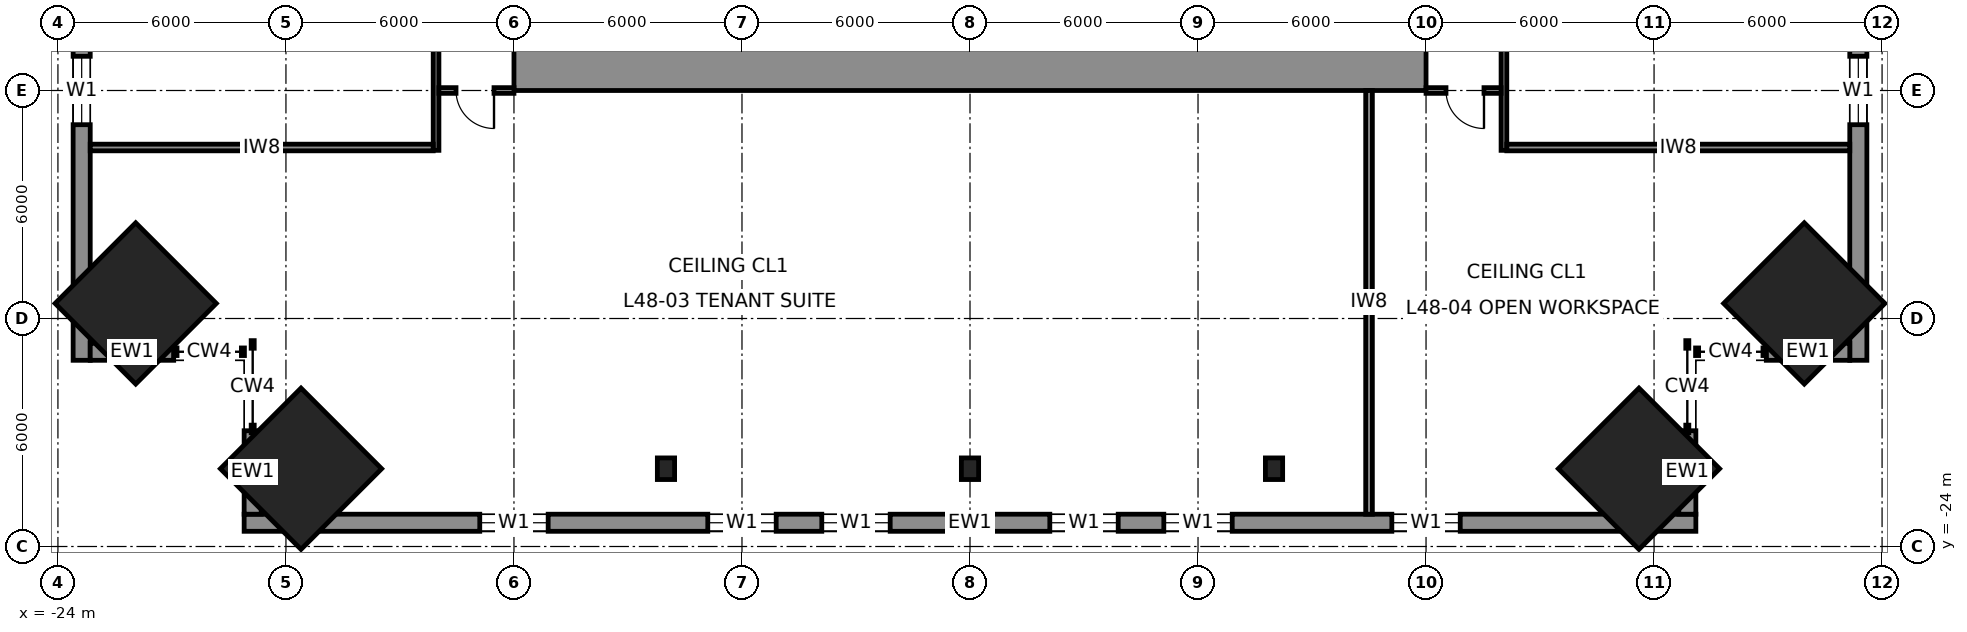
"""IFC4 building model, lengths in metres.
Left out: names, types, materials, properties, quantities, classifications, styles, units other than length and angle.
Written with IfcOpenShell. Run it as: python <this file> out.ifc"""

import sys

from ifc_helpers import new_model, si_unit, direction, frame, frame_2d, origin, origin_2d, place, context, subcontext, project, spatial, rectangle, i_section, extrude, element, fill, save


model = new_model("IFC4")
c1 = context("Model", 3, precision=1e-05, world=origin(), true_north=direction((0.0, 1.0)))
c2 = subcontext(c1, "Body", "Model", "MODEL_VIEW")
j1 = project(units=[si_unit("LENGTHUNIT", "METRE"), si_unit("PLANEANGLEUNIT", "RADIAN")], contexts=[c1])
p1 = place(None, origin())
s1 = spatial("IfcSite", under=j1, at=p1, CompositionType="ELEMENT")
p2 = place(p1, origin())
s2 = spatial("IfcBuilding", under=s1, at=p2, CompositionType="ELEMENT")
p3 = place(p2, frame((0.0, 0.0, 221.8)))
s3 = spatial("IfcBuildingStorey", under=s2, at=p3, CompositionType="ELEMENT", Elevation=221.8)
for number, where, z_axis, x_axis in (
    (1, (21.953, -17.603, 0.0), (-0.04, 0.04, 0.998), (-0.708, -0.707, 0.0)),
    (2, (17.603, -21.953, 0.0), (-0.04, 0.04, 0.998), (-0.707, -0.708, 0.0)),
    (3, (-17.603, -21.953, 0.0), (0.04, 0.04, 0.998), (-0.707, 0.708, 0.0)),
    (4, (-21.953, -17.603, 0.0), (0.04, 0.04, 0.998), (-0.708, 0.707, 0.0)),
):
    element("IfcColumn", number, at=place(p3, frame(where, z_axis=z_axis, x_axis=x_axis)), inside=s3, PredefinedType="COLUMN", context=c2, shape_type="SweptSolid", body=[
        extrude(rectangle(XDim=3.0, YDim=3.0, at=origin_2d()), origin(), (0.0, 0.0, 1.0), 4.007),
    ])
for number, where, z_axis, x_axis in (
    (5, (0.0, -21.953, 0.0), (0.0, 0.04, 0.999), (-1.0, 0.0, 0.0)),
    (6, (-8.0, -21.953, 0.0), (0.0, 0.04, 0.999), (-1.0, 0.0, 0.0)),
    (7, (8.0, -21.953, 0.0), (0.0, 0.04, 0.999), (-1.0, 0.0, 0.0)),
):
    element("IfcColumn", number, at=place(p3, frame(where, z_axis=z_axis, x_axis=x_axis)), inside=s3, PredefinedType="COLUMN", context=c2, shape_type="SweptSolid", body=[
        extrude(i_section(OverallWidth=0.454, OverallDepth=0.569, WebThickness=0.078, FlangeThickness=0.125, at=origin_2d()), origin(), (0.0, 0.0, 1.0), 4.003),
    ])
p4 = place(p3, frame((12.0, -11.25, 0.0), z_axis=(0.0, 0.0, 1.0), x_axis=(-1.0, 0.0, 0.0)))
e8 = element("IfcWall", 8, at=p4, inside=s3, PredefinedType="SHEAR", context=c2, shape_type="SweptSolid", body=[
    extrude(rectangle(XDim=24.0, YDim=1.5, at=frame_2d((12.0, 0.0))), origin(), (0.0, 0.0, 1.0), 4.0),
])
p5 = place(p3, frame((23.375, -19.1, 0.0), z_axis=(0.0, 0.0, 1.0), x_axis=(0.0, 1.0, 0.0)))
e9 = element("IfcWall", 9, at=p5, inside=s3, PredefinedType="SOLIDWALL", context=c2, shape_type="SweptSolid", body=[
    extrude(rectangle(XDim=38.2, YDim=0.45, at=frame_2d((19.1, 0.0))), origin(), (0.0, 0.0, 1.0), 3.83),
])
p6 = place(p5, frame((6.2, 0.0, 0.7)))
e10 = element("IfcOpeningElement", 10, at=p6, cuts=e9, PredefinedType="OPENING", context=c2, shape_type="SweptSolid", body=[
    extrude(rectangle(XDim=1.8, YDim=2.6, at=frame_2d((0.9, 1.3))), frame((0.0, 0.235, 0.0), z_axis=(0.0, -1.0, 0.0), x_axis=(1.0, 0.0, 0.0)), (0.0, 0.0, 1.0), 0.47),
])
p7 = place(p5, frame((12.2, 0.0, 0.7)))
e11 = element("IfcOpeningElement", 11, at=p7, cuts=e9, PredefinedType="OPENING", context=c2, shape_type="SweptSolid", body=[
    extrude(rectangle(XDim=1.8, YDim=2.6, at=frame_2d((0.9, 1.3))), frame((0.0, 0.235, 0.0), z_axis=(0.0, -1.0, 0.0), x_axis=(1.0, 0.0, 0.0)), (0.0, 0.0, 1.0), 0.47),
])
p8 = place(p5, frame((15.2, 0.0, 0.7)))
e12 = element("IfcOpeningElement", 12, at=p8, cuts=e9, PredefinedType="OPENING", context=c2, shape_type="SweptSolid", body=[
    extrude(rectangle(XDim=1.8, YDim=2.6, at=frame_2d((0.9, 1.3))), frame((0.0, 0.235, 0.0), z_axis=(0.0, -1.0, 0.0), x_axis=(1.0, 0.0, 0.0)), (0.0, 0.0, 1.0), 0.47),
])
p9 = place(p5, frame((21.2, 0.0, 0.7)))
e13 = element("IfcOpeningElement", 13, at=p9, cuts=e9, PredefinedType="OPENING", context=c2, shape_type="SweptSolid", body=[
    extrude(rectangle(XDim=1.8, YDim=2.6, at=frame_2d((0.9, 1.3))), frame((0.0, 0.235, 0.0), z_axis=(0.0, -1.0, 0.0), x_axis=(1.0, 0.0, 0.0)), (0.0, 0.0, 1.0), 0.47),
])
p10 = place(p5, frame((24.2, 0.0, 0.7)))
e14 = element("IfcOpeningElement", 14, at=p10, cuts=e9, PredefinedType="OPENING", context=c2, shape_type="SweptSolid", body=[
    extrude(rectangle(XDim=1.8, YDim=2.6, at=frame_2d((0.9, 1.3))), frame((0.0, 0.235, 0.0), z_axis=(0.0, -1.0, 0.0), x_axis=(1.0, 0.0, 0.0)), (0.0, 0.0, 1.0), 0.47),
])
p11 = place(p5, frame((30.2, 0.0, 0.7)))
e15 = element("IfcOpeningElement", 15, at=p11, cuts=e9, PredefinedType="OPENING", context=c2, shape_type="SweptSolid", body=[
    extrude(rectangle(XDim=1.8, YDim=2.6, at=frame_2d((0.9, 1.3))), frame((0.0, 0.235, 0.0), z_axis=(0.0, -1.0, 0.0), x_axis=(1.0, 0.0, 0.0)), (0.0, 0.0, 1.0), 0.47),
])
p12 = place(p3, frame((-19.1, -23.375, 0.0), z_axis=(0.0, 0.0, 1.0), x_axis=(1.0, 0.0, 0.0)))
e16 = element("IfcWall", 16, at=p12, inside=s3, PredefinedType="SOLIDWALL", context=c2, shape_type="SweptSolid", body=[
    extrude(rectangle(XDim=38.2, YDim=0.45, at=frame_2d((19.1, 0.0))), origin(), (0.0, 0.0, 1.0), 3.83),
])
p13 = place(p12, frame((6.2, 0.0, 0.7)))
e17 = element("IfcOpeningElement", 17, at=p13, cuts=e16, PredefinedType="OPENING", context=c2, shape_type="SweptSolid", body=[
    extrude(rectangle(XDim=1.8, YDim=2.6, at=frame_2d((0.9, 1.3))), frame((0.0, 0.235, 0.0), z_axis=(0.0, -1.0, 0.0), x_axis=(1.0, 0.0, 0.0)), (0.0, 0.0, 1.0), 0.47),
])
p14 = place(p12, frame((12.2, 0.0, 0.7)))
e18 = element("IfcOpeningElement", 18, at=p14, cuts=e16, PredefinedType="OPENING", context=c2, shape_type="SweptSolid", body=[
    extrude(rectangle(XDim=1.8, YDim=2.6, at=frame_2d((0.9, 1.3))), frame((0.0, 0.235, 0.0), z_axis=(0.0, -1.0, 0.0), x_axis=(1.0, 0.0, 0.0)), (0.0, 0.0, 1.0), 0.47),
])
p15 = place(p12, frame((15.2, 0.0, 0.7)))
e19 = element("IfcOpeningElement", 19, at=p15, cuts=e16, PredefinedType="OPENING", context=c2, shape_type="SweptSolid", body=[
    extrude(rectangle(XDim=1.8, YDim=2.6, at=frame_2d((0.9, 1.3))), frame((0.0, 0.235, 0.0), z_axis=(0.0, -1.0, 0.0), x_axis=(1.0, 0.0, 0.0)), (0.0, 0.0, 1.0), 0.47),
])
p16 = place(p12, frame((21.2, 0.0, 0.7)))
e20 = element("IfcOpeningElement", 20, at=p16, cuts=e16, PredefinedType="OPENING", context=c2, shape_type="SweptSolid", body=[
    extrude(rectangle(XDim=1.8, YDim=2.6, at=frame_2d((0.9, 1.3))), frame((0.0, 0.235, 0.0), z_axis=(0.0, -1.0, 0.0), x_axis=(1.0, 0.0, 0.0)), (0.0, 0.0, 1.0), 0.47),
])
p17 = place(p12, frame((24.2, 0.0, 0.7)))
e21 = element("IfcOpeningElement", 21, at=p17, cuts=e16, PredefinedType="OPENING", context=c2, shape_type="SweptSolid", body=[
    extrude(rectangle(XDim=1.8, YDim=2.6, at=frame_2d((0.9, 1.3))), frame((0.0, 0.235, 0.0), z_axis=(0.0, -1.0, 0.0), x_axis=(1.0, 0.0, 0.0)), (0.0, 0.0, 1.0), 0.47),
])
p18 = place(p12, frame((30.2, 0.0, 0.7)))
e22 = element("IfcOpeningElement", 22, at=p18, cuts=e16, PredefinedType="OPENING", context=c2, shape_type="SweptSolid", body=[
    extrude(rectangle(XDim=1.8, YDim=2.6, at=frame_2d((0.9, 1.3))), frame((0.0, 0.235, 0.0), z_axis=(0.0, -1.0, 0.0), x_axis=(1.0, 0.0, 0.0)), (0.0, 0.0, 1.0), 0.47),
])
p19 = place(p3, frame((-23.375, 19.1, 0.0), z_axis=(0.0, 0.0, 1.0), x_axis=(0.0, -1.0, 0.0)))
e23 = element("IfcWall", 23, at=p19, inside=s3, PredefinedType="SOLIDWALL", context=c2, shape_type="SweptSolid", body=[
    extrude(rectangle(XDim=38.2, YDim=0.45, at=frame_2d((19.1, 0.0))), origin(), (0.0, 0.0, 1.0), 3.83),
])
p20 = place(p19, frame((6.2, 0.0, 0.7)))
e24 = element("IfcOpeningElement", 24, at=p20, cuts=e23, PredefinedType="OPENING", context=c2, shape_type="SweptSolid", body=[
    extrude(rectangle(XDim=1.8, YDim=2.6, at=frame_2d((0.9, 1.3))), frame((0.0, 0.235, 0.0), z_axis=(0.0, -1.0, 0.0), x_axis=(1.0, 0.0, 0.0)), (0.0, 0.0, 1.0), 0.47),
])
p21 = place(p19, frame((12.2, 0.0, 0.7)))
e25 = element("IfcOpeningElement", 25, at=p21, cuts=e23, PredefinedType="OPENING", context=c2, shape_type="SweptSolid", body=[
    extrude(rectangle(XDim=1.8, YDim=2.6, at=frame_2d((0.9, 1.3))), frame((0.0, 0.235, 0.0), z_axis=(0.0, -1.0, 0.0), x_axis=(1.0, 0.0, 0.0)), (0.0, 0.0, 1.0), 0.47),
])
p22 = place(p19, frame((15.2, 0.0, 0.7)))
e26 = element("IfcOpeningElement", 26, at=p22, cuts=e23, PredefinedType="OPENING", context=c2, shape_type="SweptSolid", body=[
    extrude(rectangle(XDim=1.8, YDim=2.6, at=frame_2d((0.9, 1.3))), frame((0.0, 0.235, 0.0), z_axis=(0.0, -1.0, 0.0), x_axis=(1.0, 0.0, 0.0)), (0.0, 0.0, 1.0), 0.47),
])
p23 = place(p19, frame((21.2, 0.0, 0.7)))
e27 = element("IfcOpeningElement", 27, at=p23, cuts=e23, PredefinedType="OPENING", context=c2, shape_type="SweptSolid", body=[
    extrude(rectangle(XDim=1.8, YDim=2.6, at=frame_2d((0.9, 1.3))), frame((0.0, 0.235, 0.0), z_axis=(0.0, -1.0, 0.0), x_axis=(1.0, 0.0, 0.0)), (0.0, 0.0, 1.0), 0.47),
])
p24 = place(p19, frame((24.2, 0.0, 0.7)))
e28 = element("IfcOpeningElement", 28, at=p24, cuts=e23, PredefinedType="OPENING", context=c2, shape_type="SweptSolid", body=[
    extrude(rectangle(XDim=1.8, YDim=2.6, at=frame_2d((0.9, 1.3))), frame((0.0, 0.235, 0.0), z_axis=(0.0, -1.0, 0.0), x_axis=(1.0, 0.0, 0.0)), (0.0, 0.0, 1.0), 0.47),
])
p25 = place(p19, frame((30.2, 0.0, 0.7)))
e29 = element("IfcOpeningElement", 29, at=p25, cuts=e23, PredefinedType="OPENING", context=c2, shape_type="SweptSolid", body=[
    extrude(rectangle(XDim=1.8, YDim=2.6, at=frame_2d((0.9, 1.3))), frame((0.0, 0.235, 0.0), z_axis=(0.0, -1.0, 0.0), x_axis=(1.0, 0.0, 0.0)), (0.0, 0.0, 1.0), 0.47),
])
for number, where, z_axis, x_axis in (
    (30, (18.875, -20.954, 0.0), (0.0, 0.0, 1.0), (0.0, -1.0, 0.0)),
    (31, (20.954, -18.875, 0.0), (0.0, 0.0, 1.0), (1.0, 0.0, 0.0)),
    (32, (-18.875, -20.954, 0.0), (0.0, 0.0, 1.0), (0.0, -1.0, 0.0)),
    (33, (-20.954, -18.875, 0.0), (0.0, 0.0, 1.0), (-1.0, 0.0, 0.0)),
):
    element("IfcWall", number, at=place(p3, frame(where, z_axis=z_axis, x_axis=x_axis)), inside=s3, PredefinedType="SOLIDWALL", context=c2, shape_type="SweptSolid", body=[
        extrude(rectangle(XDim=2.196, YDim=0.45, at=frame_2d((1.098, 0.0))), origin(), (0.0, 0.0, 1.0), 3.83),
    ])
p26 = place(p3, frame((14.05, -13.575, 0.0), z_axis=(0.0, 0.0, 1.0), x_axis=(0.0, 1.0, 0.0)))
e34 = element("IfcWall", 34, at=p26, inside=s3, PredefinedType="PARTITIONING", context=c2, shape_type="SweptSolid", body=[
    extrude(rectangle(XDim=27.15, YDim=0.15, at=frame_2d((13.575, 0.0))), origin(), (0.0, 0.0, 1.0), 3.83),
])
p27 = place(p26, frame((21.425, 0.0, 0.0)))
e35 = element("IfcOpeningElement", 35, at=p27, cuts=e34, PredefinedType="OPENING", context=c2, shape_type="SweptSolid", body=[
    extrude(rectangle(XDim=1.0, YDim=2.3, at=frame_2d((0.5, 1.15))), frame((0.0, 0.085, 0.0), z_axis=(0.0, -1.0, 0.0), x_axis=(1.0, 0.0, 0.0)), (0.0, 0.0, 1.0), 0.17),
])
p28 = place(p26, frame((9.325, 0.0, 0.0)))
e36 = element("IfcOpeningElement", 36, at=p28, cuts=e34, PredefinedType="OPENING", context=c2, shape_type="SweptSolid", body=[
    extrude(rectangle(XDim=1.0, YDim=2.3, at=frame_2d((0.5, 1.15))), frame((0.0, 0.085, 0.0), z_axis=(0.0, -1.0, 0.0), x_axis=(1.0, 0.0, 0.0)), (0.0, 0.0, 1.0), 0.17),
])
p29 = place(p26, frame((16.575, 0.0, 0.0)))
e37 = element("IfcOpeningElement", 37, at=p29, cuts=e34, PredefinedType="OPENING", context=c2, shape_type="SweptSolid", body=[
    extrude(rectangle(XDim=1.0, YDim=2.3, at=frame_2d((0.5, 1.15))), frame((0.0, 0.085, 0.0), z_axis=(0.0, -1.0, 0.0), x_axis=(1.0, 0.0, 0.0)), (0.0, 0.0, 1.0), 0.17),
])
p30 = place(p3, frame((-14.05, 13.575, 0.0), z_axis=(0.0, 0.0, 1.0), x_axis=(0.0, -1.0, 0.0)))
e38 = element("IfcWall", 38, at=p30, inside=s3, PredefinedType="PARTITIONING", context=c2, shape_type="SweptSolid", body=[
    extrude(rectangle(XDim=27.15, YDim=0.15, at=frame_2d((13.575, 0.0))), origin(), (0.0, 0.0, 1.0), 3.83),
])
p31 = place(p30, frame((4.725, 0.0, 0.0)))
e39 = element("IfcOpeningElement", 39, at=p31, cuts=e38, PredefinedType="OPENING", context=c2, shape_type="SweptSolid", body=[
    extrude(rectangle(XDim=1.0, YDim=2.3, at=frame_2d((0.5, 1.15))), frame((0.0, 0.085, 0.0), z_axis=(0.0, -1.0, 0.0), x_axis=(1.0, 0.0, 0.0)), (0.0, 0.0, 1.0), 0.17),
])
p32 = place(p30, frame((9.825, 0.0, 0.0)))
e40 = element("IfcOpeningElement", 40, at=p32, cuts=e38, PredefinedType="OPENING", context=c2, shape_type="SweptSolid", body=[
    extrude(rectangle(XDim=1.0, YDim=2.3, at=frame_2d((0.5, 1.15))), frame((0.0, 0.085, 0.0), z_axis=(0.0, -1.0, 0.0), x_axis=(1.0, 0.0, 0.0)), (0.0, 0.0, 1.0), 0.17),
])
p33 = place(p30, frame((18.075, 0.0, 0.0)))
e41 = element("IfcOpeningElement", 41, at=p33, cuts=e38, PredefinedType="OPENING", context=c2, shape_type="SweptSolid", body=[
    extrude(rectangle(XDim=1.0, YDim=2.3, at=frame_2d((0.5, 1.15))), frame((0.0, 0.085, 0.0), z_axis=(0.0, -1.0, 0.0), x_axis=(1.0, 0.0, 0.0)), (0.0, 0.0, 1.0), 0.17),
])
p34 = place(p3, frame((13.975, -12.0, 0.0), z_axis=(0.0, 0.0, 1.0), x_axis=(-1.0, 0.0, 0.0)))
e42 = element("IfcWall", 42, at=p34, inside=s3, PredefinedType="PARTITIONING", context=c2, shape_type="SweptSolid", body=[
    extrude(rectangle(XDim=1.975, YDim=0.15, at=frame_2d((0.988, 0.0))), origin(), (0.0, 0.0, 1.0), 3.83),
])
p35 = place(p34, frame((0.45, 0.0, 0.0)))
e43 = element("IfcOpeningElement", 43, at=p35, cuts=e42, PredefinedType="OPENING", context=c2, shape_type="SweptSolid", body=[
    extrude(rectangle(XDim=1.0, YDim=2.3, at=frame_2d((0.5, 1.15))), frame((0.0, 0.085, 0.0), z_axis=(0.0, -1.0, 0.0), x_axis=(1.0, 0.0, 0.0)), (0.0, 0.0, 1.0), 0.17),
])
p36 = place(p3, frame((-12.0, -12.0, 0.0), z_axis=(0.0, 0.0, 1.0), x_axis=(-1.0, 0.0, 0.0)))
e44 = element("IfcWall", 44, at=p36, inside=s3, PredefinedType="PARTITIONING", context=c2, shape_type="SweptSolid", body=[
    extrude(rectangle(XDim=1.975, YDim=0.15, at=frame_2d((0.988, 0.0))), origin(), (0.0, 0.0, 1.0), 3.83),
])
p37 = place(p36, frame((0.525, 0.0, 0.0)))
e45 = element("IfcOpeningElement", 45, at=p37, cuts=e44, PredefinedType="OPENING", context=c2, shape_type="SweptSolid", body=[
    extrude(rectangle(XDim=1.0, YDim=2.3, at=frame_2d((0.5, 1.15))), frame((0.0, 0.085, 0.0), z_axis=(0.0, -1.0, 0.0), x_axis=(1.0, 0.0, 0.0)), (0.0, 0.0, 1.0), 0.17),
])
for number, where, z_axis, x_axis in (
    (46, (23.15, -13.5, 0.0), (0.0, 0.0, 1.0), (-1.0, 0.0, 0.0)),
    (47, (-14.125, -13.5, 0.0), (0.0, 0.0, 1.0), (-1.0, 0.0, 0.0)),
):
    element("IfcWall", number, at=place(p3, frame(where, z_axis=z_axis, x_axis=x_axis)), inside=s3, PredefinedType="PARTITIONING", context=c2, shape_type="SweptSolid", body=[
        extrude(rectangle(XDim=9.025, YDim=0.175, at=frame_2d((4.512, 0.0))), origin(), (0.0, 0.0, 1.0), 3.83),
    ])
p38 = place(p3, frame((10.5, -12.0, 0.0), z_axis=(0.0, 0.0, 1.0), x_axis=(0.0, -1.0, 0.0)))
e48 = element("IfcWall", 48, at=p38, inside=s3, PredefinedType="PARTITIONING", context=c2, shape_type="SweptSolid", body=[
    extrude(rectangle(XDim=11.15, YDim=0.175, at=frame_2d((5.575, 0.0))), origin(), (0.0, 0.0, 1.0), 3.83),
])
p39 = place(p6, origin())
e49 = element("IfcWindow", 49, at=p39, inside=s3, PartitioningType="SINGLE_PANEL", PredefinedType="WINDOW", context=c2, shape_type="SweptSolid", body=[
    extrude(rectangle(XDim=1.8, YDim=2.6, at=frame_2d((0.9, 1.3))), frame((0.0, 0.03, 0.0), z_axis=(0.0, -1.0, 0.0), x_axis=(1.0, 0.0, 0.0)), (0.0, 0.0, 1.0), 0.06),
])
fill(e10, e49)
p40 = place(p13, origin())
e50 = element("IfcWindow", 50, at=p40, inside=s3, PartitioningType="SINGLE_PANEL", PredefinedType="WINDOW", context=c2, shape_type="SweptSolid", body=[
    extrude(rectangle(XDim=1.8, YDim=2.6, at=frame_2d((0.9, 1.3))), frame((0.0, 0.03, 0.0), z_axis=(0.0, -1.0, 0.0), x_axis=(1.0, 0.0, 0.0)), (0.0, 0.0, 1.0), 0.06),
])
fill(e17, e50)
p41 = place(p14, origin())
e51 = element("IfcWindow", 51, at=p41, inside=s3, PartitioningType="SINGLE_PANEL", PredefinedType="WINDOW", context=c2, shape_type="SweptSolid", body=[
    extrude(rectangle(XDim=1.8, YDim=2.6, at=frame_2d((0.9, 1.3))), frame((0.0, 0.03, 0.0), z_axis=(0.0, -1.0, 0.0), x_axis=(1.0, 0.0, 0.0)), (0.0, 0.0, 1.0), 0.06),
])
fill(e18, e51)
p42 = place(p15, origin())
e52 = element("IfcWindow", 52, at=p42, inside=s3, PartitioningType="SINGLE_PANEL", PredefinedType="WINDOW", context=c2, shape_type="SweptSolid", body=[
    extrude(rectangle(XDim=1.8, YDim=2.6, at=frame_2d((0.9, 1.3))), frame((0.0, 0.03, 0.0), z_axis=(0.0, -1.0, 0.0), x_axis=(1.0, 0.0, 0.0)), (0.0, 0.0, 1.0), 0.06),
])
fill(e19, e52)
p43 = place(p16, origin())
e53 = element("IfcWindow", 53, at=p43, inside=s3, PartitioningType="SINGLE_PANEL", PredefinedType="WINDOW", context=c2, shape_type="SweptSolid", body=[
    extrude(rectangle(XDim=1.8, YDim=2.6, at=frame_2d((0.9, 1.3))), frame((0.0, 0.03, 0.0), z_axis=(0.0, -1.0, 0.0), x_axis=(1.0, 0.0, 0.0)), (0.0, 0.0, 1.0), 0.06),
])
fill(e20, e53)
p44 = place(p17, origin())
e54 = element("IfcWindow", 54, at=p44, inside=s3, PartitioningType="SINGLE_PANEL", PredefinedType="WINDOW", context=c2, shape_type="SweptSolid", body=[
    extrude(rectangle(XDim=1.8, YDim=2.6, at=frame_2d((0.9, 1.3))), frame((0.0, 0.03, 0.0), z_axis=(0.0, -1.0, 0.0), x_axis=(1.0, 0.0, 0.0)), (0.0, 0.0, 1.0), 0.06),
])
fill(e21, e54)
p45 = place(p18, origin())
e55 = element("IfcWindow", 55, at=p45, inside=s3, PartitioningType="SINGLE_PANEL", PredefinedType="WINDOW", context=c2, shape_type="SweptSolid", body=[
    extrude(rectangle(XDim=1.8, YDim=2.6, at=frame_2d((0.9, 1.3))), frame((0.0, 0.03, 0.0), z_axis=(0.0, -1.0, 0.0), x_axis=(1.0, 0.0, 0.0)), (0.0, 0.0, 1.0), 0.06),
])
fill(e22, e55)
p46 = place(p25, origin())
e56 = element("IfcWindow", 56, at=p46, inside=s3, PartitioningType="SINGLE_PANEL", PredefinedType="WINDOW", context=c2, shape_type="SweptSolid", body=[
    extrude(rectangle(XDim=1.8, YDim=2.6, at=frame_2d((0.9, 1.3))), frame((0.0, 0.03, 0.0), z_axis=(0.0, -1.0, 0.0), x_axis=(1.0, 0.0, 0.0)), (0.0, 0.0, 1.0), 0.06),
])
fill(e29, e56)
p47 = place(p37, origin())
e57 = element("IfcDoor", 57, at=p47, inside=s3, OperationType="SINGLE_SWING_LEFT", PredefinedType="DOOR", context=c2, shape_type="SweptSolid", body=[
    extrude(rectangle(XDim=1.0, YDim=2.3, at=frame_2d((0.5, 1.15))), frame((0.0, 0.025, 0.0), z_axis=(0.0, -1.0, 0.0), x_axis=(1.0, 0.0, 0.0)), (0.0, 0.0, 1.0), 0.05),
])
fill(e45, e57)
p48 = place(p35, origin())
e58 = element("IfcDoor", 58, at=p48, inside=s3, OperationType="SINGLE_SWING_LEFT", PredefinedType="DOOR", context=c2, shape_type="SweptSolid", body=[
    extrude(rectangle(XDim=1.0, YDim=2.3, at=frame_2d((0.5, 1.15))), frame((0.0, 0.025, 0.0), z_axis=(0.0, -1.0, 0.0), x_axis=(1.0, 0.0, 0.0)), (0.0, 0.0, 1.0), 0.05),
])
fill(e43, e58)
save(model, sys.argv[1])
